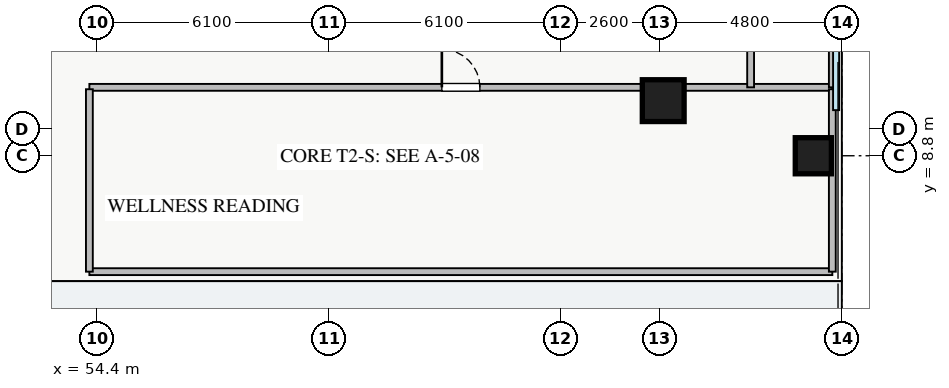
"""IFC4 building model, lengths in metres.
Left out: names, types, materials, properties, quantities, classifications, styles, units other than length and angle.
Written with IfcOpenShell. Run it as: python <this file> out.ifc"""

import sys

from ifc_helpers import new_model, si_unit, direction, frame, frame_2d, origin, origin_2d, place, context, subcontext, project, spatial, rectangle, extrude, source, transform, mapped, element, fill, save


model = new_model("IFC4")
c1 = context("Model", 3, precision=1e-05, world=origin(), true_north=direction((0.0, 1.0)))
c2 = subcontext(c1, "Body", "Model", "MODEL_VIEW")
j1 = project(units=[si_unit("LENGTHUNIT", "METRE"), si_unit("PLANEANGLEUNIT", "RADIAN")], contexts=[c1])
p1 = place(None, origin())
s1 = spatial("IfcSite", under=j1, at=p1, CompositionType="ELEMENT")
p2 = place(p1, origin())
s2 = spatial("IfcBuilding", under=s1, at=p2, CompositionType="ELEMENT")
p3 = place(p2, frame((0.0, 0.0, 13.8)))
s3 = spatial("IfcBuildingStorey", under=s2, at=p3, CompositionType="ELEMENT", Elevation=13.8)
m1 = source(origin(), c2, "Body", "SweptSolid", [
    extrude(rectangle(XDim=1.1, YDim=1.1, at=origin_2d()), origin(), (0.0, 0.0, 1.0), 4.4),
])
p4 = place(p3, frame((69.3, 10.25, 0.0), z_axis=(0.0, 0.0, 1.0), x_axis=(1.0, 0.0, 0.0)))
e1 = element("IfcColumn", 1, at=p4, inside=s3, PredefinedType="COLUMN", context=c2, shape_type="MappedRepresentation", body=[
    mapped(m1, transform((0.0, 0.0, 0.0), x_axis=(1.0, 0.0, 0.0), y_axis=(0.0, 1.0, 0.0), z_axis=(0.0, 0.0, 1.0), scale=1.0)),
])
m2 = source(origin(), c2, "Body", "SweptSolid", [
    extrude(rectangle(XDim=0.95, YDim=0.95, at=origin_2d()), origin(), (0.0, 0.0, 1.0), 4.4),
])
p5 = place(p3, frame((73.25, 8.8, 0.0), z_axis=(0.0, 0.0, 1.0), x_axis=(1.0, 0.0, 0.0)))
e2 = element("IfcColumn", 2, at=p5, inside=s3, PredefinedType="COLUMN", context=c2, shape_type="MappedRepresentation", body=[
    mapped(m2, transform((0.0, 0.0, 0.0), x_axis=(1.0, 0.0, 0.0), y_axis=(0.0, 1.0, 0.0), z_axis=(0.0, 0.0, 1.0), scale=1.0)),
])
p6 = place(p3, frame((54.2, 10.6, 0.0), z_axis=(0.0, 0.0, 1.0), x_axis=(1.0, 0.0, 0.0)))
e3 = element("IfcWall", 3, at=p6, inside=s3, PredefinedType="PARTITIONING", context=c2, shape_type="SweptSolid", body=[
    extrude(rectangle(XDim=19.55, YDim=0.18, at=frame_2d((9.775, 0.0))), origin(), (0.0, 0.0, 1.0), 4.15),
])
p7 = place(p6, frame((9.275, 0.0, 0.0)))
e4 = element("IfcOpeningElement", 4, at=p7, cuts=e3, PredefinedType="OPENING", context=c2, shape_type="SweptSolid", body=[
    extrude(rectangle(XDim=1.0, YDim=2.05, at=frame_2d((0.5, 1.025))), frame((0.0, 0.1, 0.0), z_axis=(0.0, -1.0, 0.0), x_axis=(1.0, 0.0, 0.0)), (0.0, 0.0, 1.0), 0.2),
])
p8 = place(p3, frame((71.6, 10.6, 0.0), z_axis=(0.0, 0.0, 1.0), x_axis=(0.0, 1.0, 0.0)))
e5 = element("IfcWall", 5, at=p8, inside=s3, PredefinedType="PARTITIONING", context=c2, shape_type="SweptSolid", body=[
    extrude(rectangle(XDim=24.8, YDim=0.18, at=frame_2d((12.4, 0.0))), origin(), (0.0, 0.0, 1.0), 4.15),
])
p9 = place(p8, frame((11.9, 0.0, 0.0)))
e6 = element("IfcOpeningElement", 6, at=p9, cuts=e5, PredefinedType="OPENING", context=c2, shape_type="SweptSolid", body=[
    extrude(rectangle(XDim=1.0, YDim=2.05, at=frame_2d((0.5, 1.025))), frame((0.0, 0.1, 0.0), z_axis=(0.0, -1.0, 0.0), x_axis=(1.0, 0.0, 0.0)), (0.0, 0.0, 1.0), 0.2),
])
p10 = place(p3, frame((73.75, 10.6, 0.0), z_axis=(0.0, 0.0, 1.0), x_axis=(0.0, 1.0, 0.0)))
e7 = element("IfcWall", 7, at=p10, inside=s3, PredefinedType="PARTITIONING", context=c2, shape_type="SweptSolid", body=[
    extrude(rectangle(XDim=24.8, YDim=0.18, at=frame_2d((12.4, 0.0))), origin(), (0.0, 0.0, 1.0), 4.15),
])
p11 = place(p3, frame((54.2, 5.75, 0.0), z_axis=(0.0, 0.0, 1.0), x_axis=(1.0, 0.0, 0.0)))
e8 = element("IfcWall", 8, at=p11, inside=s3, PredefinedType="PARTITIONING", context=c2, shape_type="SweptSolid", body=[
    extrude(rectangle(XDim=19.55, YDim=0.18, at=frame_2d((9.775, 0.0))), origin(), (0.0, 0.0, 1.0), 4.15),
])
for number, where, z_axis, x_axis in (
    (9, (54.2, 5.75, 0.0), (0.0, 0.0, 1.0), (0.0, 1.0, 0.0)),
    (10, (73.75, 5.75, 0.0), (0.0, 0.0, 1.0), (0.0, 1.0, 0.0)),
):
    element("IfcWall", number, at=place(p3, frame(where, z_axis=z_axis, x_axis=x_axis)), inside=s3, PredefinedType="PARTITIONING", context=c2, shape_type="SweptSolid", body=[
        extrude(rectangle(XDim=4.8, YDim=0.18, at=frame_2d((2.4, 0.0))), origin(), (0.0, 0.0, 1.0), 4.15),
    ])
m3 = source(origin(), c2, "Body", "SweptSolid", [
    extrude(rectangle(XDim=1.0, YDim=2.05, at=frame_2d((0.5, 1.025))), frame((0.0, 0.025, 0.0), z_axis=(0.0, -1.0, 0.0), x_axis=(1.0, 0.0, 0.0)), (0.0, 0.0, 1.0), 0.05),
])
p12 = place(p7, origin())
e11 = element("IfcDoor", 11, at=p12, inside=s3, OperationType="SINGLE_SWING_LEFT", PredefinedType="DOOR", context=c2, shape_type="MappedRepresentation", body=[
    mapped(m3, transform((0.0, 0.0, 0.0), x_axis=(1.0, 0.0, 0.0), y_axis=(0.0, 1.0, 0.0), z_axis=(0.0, 0.0, 1.0), scale=1.0)),
])
fill(e4, e11)
save(model, sys.argv[1])
